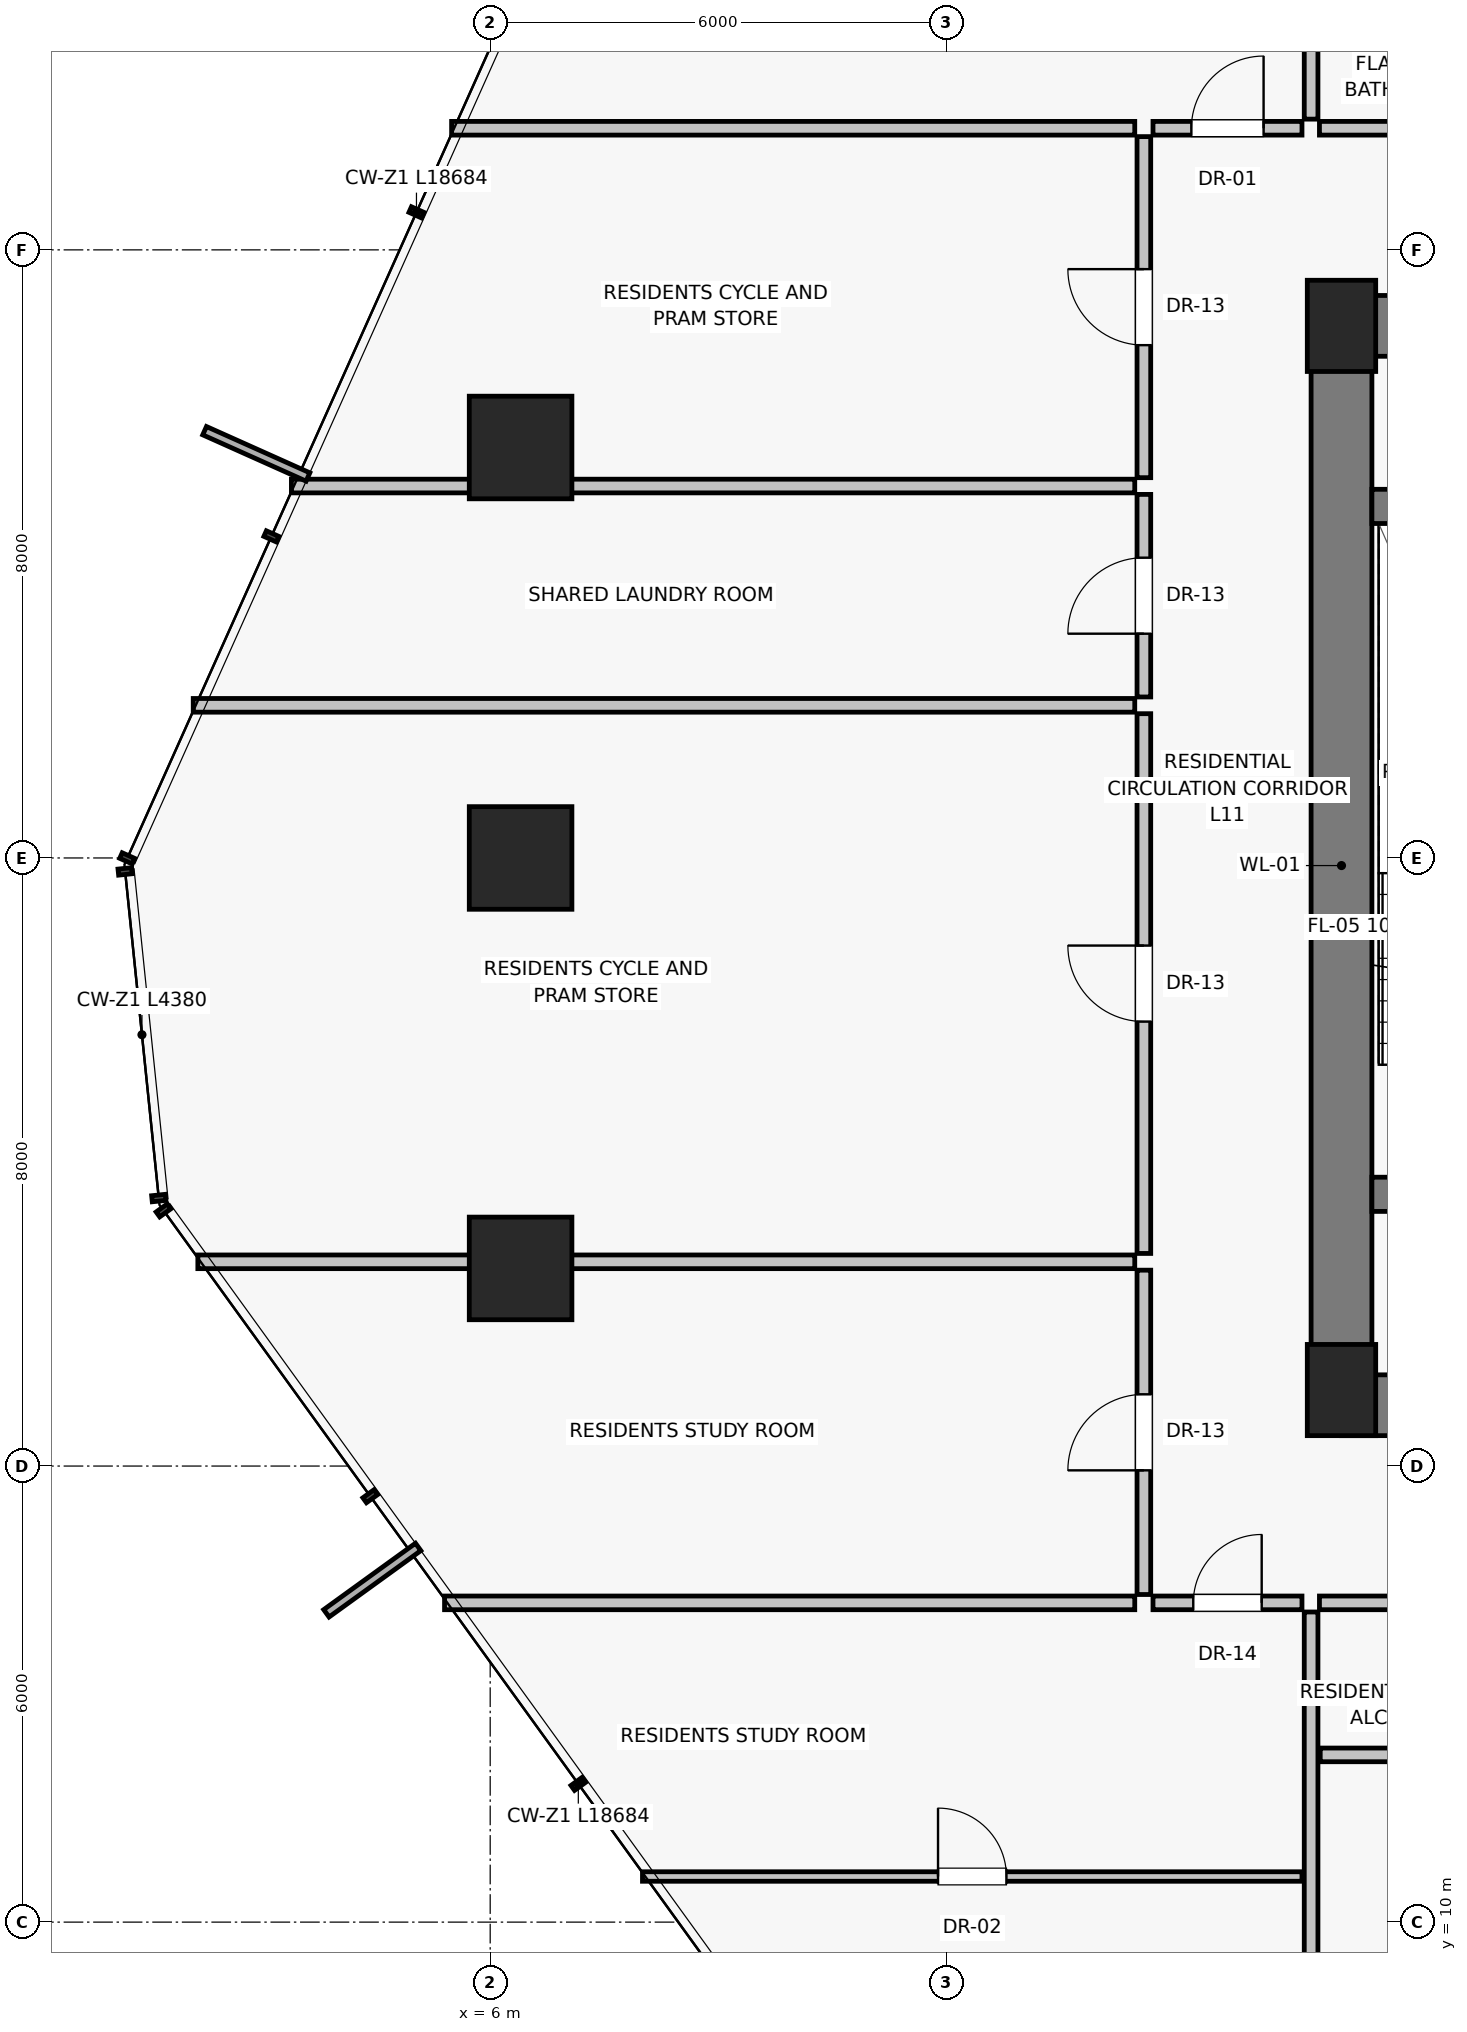
"""IFC4 building model, lengths in metres.
Left out: names, types, materials, properties, quantities, classifications, styles, units other than length and angle.
Written with IfcOpenShell. Run it as: python <this file> out.ifc"""

import sys

from ifc_helpers import new_model, si_unit, direction, frame, frame_2d, origin, origin_2d, place, context, subcontext, project, spatial, rectangle, extrude, source, transform, mapped, element, fill, save


model = new_model("IFC4")
c1 = context("Model", 3, precision=1e-05, world=origin(), true_north=direction((0.0, 1.0)))
c2 = subcontext(c1, "Body", "Model", "MODEL_VIEW")
j1 = project(units=[si_unit("LENGTHUNIT", "METRE"), si_unit("PLANEANGLEUNIT", "RADIAN")], contexts=[c1])
p1 = place(None, origin())
s1 = spatial("IfcSite", under=j1, at=p1, CompositionType="ELEMENT")
p2 = place(p1, origin())
s2 = spatial("IfcBuilding", under=s1, at=p2, CompositionType="ELEMENT")
p3 = place(p2, frame((0.0, 0.0, 43.55)))
s3 = spatial("IfcBuildingStorey", under=s2, at=p3, CompositionType="ELEMENT", Elevation=43.55)
for number, where, z_axis, x_axis in (
    (1, (17.2, 17.0, 0.0), (0.0, 0.0, 1.0), (1.0, 0.0, 0.0)),
    (2, (17.2, 31.0, 0.0), (0.0, 0.0, 1.0), (1.0, 0.0, 0.0)),
):
    element("IfcColumn", number, at=place(p3, frame(where, z_axis=z_axis, x_axis=x_axis)), inside=s3, PredefinedType="PILASTER", context=c2, shape_type="SweptSolid", body=[
        extrude(rectangle(XDim=0.9, YDim=1.2, at=origin_2d()), origin(), (0.0, 0.0, 1.0), 3.25),
    ])
for number, where, z_axis, x_axis in (
    (3, (6.4, 29.4, 0.0), (0.0, 0.0, 1.0), (1.0, 0.0, 0.0)),
    (4, (6.4, 24.0, 0.0), (0.0, 0.0, 1.0), (1.0, 0.0, 0.0)),
    (5, (6.4, 18.6, 0.0), (0.0, 0.0, 1.0), (1.0, 0.0, 0.0)),
):
    element("IfcColumn", number, at=place(p3, frame(where, z_axis=z_axis, x_axis=x_axis)), inside=s3, PredefinedType="COLUMN", context=c2, shape_type="SweptSolid", body=[
        extrude(rectangle(XDim=1.35, YDim=1.35, at=origin_2d()), origin(), (0.0, 0.0, 1.0), 3.25),
    ])
p4 = place(p3, frame((17.2, 16.8, 0.0), z_axis=(0.0, 0.0, 1.0), x_axis=(0.0, 1.0, 0.0)))
e6 = element("IfcWall", 6, at=p4, inside=s3, PredefinedType="SHEAR", context=c2, shape_type="SweptSolid", body=[
    extrude(rectangle(XDim=14.2, YDim=0.8, at=frame_2d((7.1, 0.0))), origin(), (0.0, 0.0, 1.0), 3.0),
])
p5 = place(p3, frame((17.2, 16.8, 0.0), z_axis=(0.0, 0.0, 1.0), x_axis=(1.0, 0.0, 0.0)))
e7 = element("IfcWall", 7, at=p5, inside=s3, PredefinedType="SHEAR", context=c2, shape_type="SweptSolid", body=[
    extrude(rectangle(XDim=5.85, YDim=0.8, at=frame_2d((2.925, 0.0))), origin(), (0.0, 0.0, 1.0), 3.0),
])
p6 = place(p5, frame((1.15, 0.0, 0.0)))
e8 = element("IfcOpeningElement", 8, at=p6, cuts=e7, PredefinedType="OPENING", context=c2, shape_type="SweptSolid", body=[
    extrude(rectangle(XDim=1.2, YDim=2.03, at=frame_2d((0.6, 1.015))), frame((0.0, 0.41, 0.0), z_axis=(0.0, -1.0, 0.0), x_axis=(1.0, 0.0, 0.0)), (0.0, 0.0, 1.0), 0.82),
])
p7 = place(p3, frame((17.2, 31.0, 0.0), z_axis=(0.0, 0.0, 1.0), x_axis=(1.0, 0.0, 0.0)))
e9 = element("IfcWall", 9, at=p7, inside=s3, PredefinedType="SHEAR", context=c2, shape_type="SweptSolid", body=[
    extrude(rectangle(XDim=3.8, YDim=0.8, at=frame_2d((1.9, 0.0))), origin(), (0.0, 0.0, 1.0), 3.0),
])
p8 = place(p7, frame((1.25, 0.0, 0.0)))
e10 = element("IfcOpeningElement", 10, at=p8, cuts=e9, PredefinedType="OPENING", context=c2, shape_type="SweptSolid", body=[
    extrude(rectangle(XDim=0.86, YDim=2.01, at=frame_2d((0.43, 1.005))), frame((0.0, 0.41, 0.0), z_axis=(0.0, -1.0, 0.0), x_axis=(1.0, 0.0, 0.0)), (0.0, 0.0, 1.0), 0.82),
])
p9 = place(p3, frame((17.6, 19.575, 0.0), z_axis=(0.0, 0.0, 1.0), x_axis=(1.0, 0.0, 0.0)))
e11 = element("IfcWall", 11, at=p9, inside=s3, PredefinedType="SHEAR", context=c2, shape_type="SweptSolid", body=[
    extrude(rectangle(XDim=3.425, YDim=0.45, at=frame_2d((1.712, 0.0))), origin(), (0.0, 0.0, 1.0), 3.0),
])
p10 = place(p9, frame((1.05, 0.0, 0.0)))
e12 = element("IfcOpeningElement", 12, at=p10, cuts=e11, PredefinedType="OPENING", context=c2, shape_type="SweptSolid", body=[
    extrude(rectangle(XDim=1.1, YDim=2.03, at=frame_2d((0.55, 1.015))), frame((0.0, 0.235, 0.0), z_axis=(0.0, -1.0, 0.0), x_axis=(1.0, 0.0, 0.0)), (0.0, 0.0, 1.0), 0.47),
])
p11 = place(p3, frame((17.6, 28.625, 0.0), z_axis=(0.0, 0.0, 1.0), x_axis=(1.0, 0.0, 0.0)))
e13 = element("IfcWall", 13, at=p11, inside=s3, PredefinedType="SHEAR", context=c2, shape_type="SweptSolid", body=[
    extrude(rectangle(XDim=3.425, YDim=0.45, at=frame_2d((1.712, 0.0))), origin(), (0.0, 0.0, 1.0), 3.0),
])
p12 = place(p3, frame((16.8, 14.08, 0.0), z_axis=(0.0, 0.0, 1.0), x_axis=(0.0, -1.0, 0.0)))
e14 = element("IfcWall", 14, at=p12, inside=s3, PredefinedType="PARTITIONING", context=c2, shape_type="SweptSolid", body=[
    extrude(rectangle(XDim=11.746, YDim=0.18, at=frame_2d((5.873, 0.0))), origin(), (0.0, 0.0, 1.0), 3.0),
])
p13 = place(p3, frame((16.91, 14.2, 0.0), z_axis=(0.0, 0.0, 1.0), x_axis=(1.0, 0.0, 0.0)))
e15 = element("IfcWall", 15, at=p13, inside=s3, PredefinedType="PARTITIONING", context=c2, shape_type="SweptSolid", body=[
    extrude(rectangle(XDim=4.1, YDim=0.18, at=frame_2d((2.05, 0.0))), origin(), (0.0, 0.0, 1.0), 3.0),
])
p14 = place(p13, frame((1.55, 0.0, 0.0)))
e16 = element("IfcOpeningElement", 16, at=p14, cuts=e15, PredefinedType="OPENING", context=c2, shape_type="SweptSolid", body=[
    extrude(rectangle(XDim=1.0, YDim=2.01, at=frame_2d((0.5, 1.005))), frame((0.0, 0.1, 0.0), z_axis=(0.0, -1.0, 0.0), x_axis=(1.0, 0.0, 0.0)), (0.0, 0.0, 1.0), 0.2),
])
p15 = place(p3, frame((16.92, 12.2, 0.0), z_axis=(0.0, 0.0, 1.0), x_axis=(1.0, 0.0, 0.0)))
e17 = element("IfcWall", 17, at=p15, inside=s3, PredefinedType="PARTITIONING", context=c2, shape_type="SweptSolid", body=[
    extrude(rectangle(XDim=4.1, YDim=0.18, at=frame_2d((2.05, 0.0))), origin(), (0.0, 0.0, 1.0), 3.0),
])
p16 = place(p3, frame((16.8, 33.72, 0.0), z_axis=(0.0, 0.0, 1.0), x_axis=(0.0, 1.0, 0.0)))
e18 = element("IfcWall", 18, at=p16, inside=s3, PredefinedType="PARTITIONING", context=c2, shape_type="SweptSolid", body=[
    extrude(rectangle(XDim=10.463, YDim=0.18, at=frame_2d((5.231, 0.0))), origin(), (0.0, 0.0, 1.0), 3.0),
])
p17 = place(p3, frame((16.91, 33.6, 0.0), z_axis=(0.0, 0.0, 1.0), x_axis=(1.0, 0.0, 0.0)))
e19 = element("IfcWall", 19, at=p17, inside=s3, PredefinedType="PARTITIONING", context=c2, shape_type="SweptSolid", body=[
    extrude(rectangle(XDim=5.788, YDim=0.18, at=frame_2d((2.894, 0.0))), origin(), (0.0, 0.0, 1.0), 3.0),
])
p18 = place(p17, frame((3.484, 0.0, 0.0)))
e20 = element("IfcOpeningElement", 20, at=p18, cuts=e19, PredefinedType="OPENING", context=c2, shape_type="SweptSolid", body=[
    extrude(rectangle(XDim=0.95, YDim=2.02, at=frame_2d((0.475, 1.01))), frame((0.0, 0.1, 0.0), z_axis=(0.0, -1.0, 0.0), x_axis=(1.0, 0.0, 0.0)), (0.0, 0.0, 1.0), 0.2),
])
p19 = place(p3, frame((14.48, 14.2, 0.0), z_axis=(0.0, 0.0, 1.0), x_axis=(-1.0, 0.0, 0.0)))
e21 = element("IfcWall", 21, at=p19, inside=s3, PredefinedType="PARTITIONING", context=c2, shape_type="SweptSolid", body=[
    extrude(rectangle(XDim=9.08, YDim=0.18, at=frame_2d((4.54, 0.0))), origin(), (0.0, 0.0, 1.0), 3.0),
])
p20 = place(p3, frame((14.48, 33.6, 0.0), z_axis=(0.0, 0.0, 1.0), x_axis=(-1.0, 0.0, 0.0)))
e22 = element("IfcWall", 22, at=p20, inside=s3, PredefinedType="PARTITIONING", context=c2, shape_type="SweptSolid", body=[
    extrude(rectangle(XDim=8.988, YDim=0.18, at=frame_2d((4.494, 0.0))), origin(), (0.0, 0.0, 1.0), 3.0),
])
p21 = place(p3, frame((14.6, 14.31, 0.0), z_axis=(0.0, 0.0, 1.0), x_axis=(0.0, 1.0, 0.0)))
e23 = element("IfcWall", 23, at=p21, inside=s3, PredefinedType="PARTITIONING", context=c2, shape_type="SweptSolid", body=[
    extrude(rectangle(XDim=4.267, YDim=0.18, at=frame_2d((2.133, 0.0))), origin(), (0.0, 0.0, 1.0), 3.0),
])
p22 = place(p21, frame((1.634, 0.0, 0.0)))
e24 = element("IfcOpeningElement", 24, at=p22, cuts=e23, PredefinedType="OPENING", context=c2, shape_type="SweptSolid", body=[
    extrude(rectangle(XDim=1.0, YDim=2.01, at=frame_2d((0.5, 1.005))), frame((0.0, 0.1, 0.0), z_axis=(0.0, -1.0, 0.0), x_axis=(1.0, 0.0, 0.0)), (0.0, 0.0, 1.0), 0.2),
])
p23 = place(p3, frame((14.6, 18.797, 0.0), z_axis=(0.0, 0.0, 1.0), x_axis=(0.0, 1.0, 0.0)))
e25 = element("IfcWall", 25, at=p23, inside=s3, PredefinedType="PARTITIONING", context=c2, shape_type="SweptSolid", body=[
    extrude(rectangle(XDim=7.101, YDim=0.18, at=frame_2d((3.55, 0.0))), origin(), (0.0, 0.0, 1.0), 3.0),
])
p24 = place(p23, frame((3.051, 0.0, 0.0)))
e26 = element("IfcOpeningElement", 26, at=p24, cuts=e25, PredefinedType="OPENING", context=c2, shape_type="SweptSolid", body=[
    extrude(rectangle(XDim=1.0, YDim=2.01, at=frame_2d((0.5, 1.005))), frame((0.0, 0.1, 0.0), z_axis=(0.0, -1.0, 0.0), x_axis=(1.0, 0.0, 0.0)), (0.0, 0.0, 1.0), 0.2),
])
p25 = place(p3, frame((14.48, 18.687, 0.0), z_axis=(0.0, 0.0, 1.0), x_axis=(-1.0, 0.0, 0.0)))
e27 = element("IfcWall", 27, at=p25, inside=s3, PredefinedType="PARTITIONING", context=c2, shape_type="SweptSolid", body=[
    extrude(rectangle(XDim=12.326, YDim=0.18, at=frame_2d((6.163, 0.0))), origin(), (0.0, 0.0, 1.0), 2.299),
])
p26 = place(p3, frame((14.48, 26.008, 0.0), z_axis=(0.0, 0.0, 1.0), x_axis=(-1.0, 0.0, 0.0)))
e28 = element("IfcWall", 28, at=p26, inside=s3, PredefinedType="PARTITIONING", context=c2, shape_type="SweptSolid", body=[
    extrude(rectangle(XDim=12.387, YDim=0.18, at=frame_2d((6.193, 0.0))), origin(), (0.0, 0.0, 1.0), 3.0),
])
p27 = place(p3, frame((14.6, 26.118, 0.0), z_axis=(0.0, 0.0, 1.0), x_axis=(0.0, 1.0, 0.0)))
e29 = element("IfcWall", 29, at=p27, inside=s3, PredefinedType="PARTITIONING", context=c2, shape_type="SweptSolid", body=[
    extrude(rectangle(XDim=2.665, YDim=0.18, at=frame_2d((1.333, 0.0))), origin(), (0.0, 0.0, 1.0), 3.0),
])
p28 = place(p27, frame((0.833, 0.0, 0.0)))
e30 = element("IfcOpeningElement", 30, at=p28, cuts=e29, PredefinedType="OPENING", context=c2, shape_type="SweptSolid", body=[
    extrude(rectangle(XDim=1.0, YDim=2.01, at=frame_2d((0.5, 1.005))), frame((0.0, 0.1, 0.0), z_axis=(0.0, -1.0, 0.0), x_axis=(1.0, 0.0, 0.0)), (0.0, 0.0, 1.0), 0.2),
])
p29 = place(p3, frame((14.6, 29.003, 0.0), z_axis=(0.0, 0.0, 1.0), x_axis=(0.0, 1.0, 0.0)))
e31 = element("IfcWall", 31, at=p29, inside=s3, PredefinedType="PARTITIONING", context=c2, shape_type="SweptSolid", body=[
    extrude(rectangle(XDim=4.487, YDim=0.18, at=frame_2d((2.244, 0.0))), origin(), (0.0, 0.0, 1.0), 3.0),
])
p30 = place(p29, frame((1.743, 0.0, 0.0)))
e32 = element("IfcOpeningElement", 32, at=p30, cuts=e31, PredefinedType="OPENING", context=c2, shape_type="SweptSolid", body=[
    extrude(rectangle(XDim=1.0, YDim=2.01, at=frame_2d((0.5, 1.005))), frame((0.0, 0.1, 0.0), z_axis=(0.0, -1.0, 0.0), x_axis=(1.0, 0.0, 0.0)), (0.0, 0.0, 1.0), 0.2),
])
p31 = place(p3, frame((14.48, 28.893, 0.0), z_axis=(0.0, 0.0, 1.0), x_axis=(-1.0, 0.0, 0.0)))
e33 = element("IfcWall", 33, at=p31, inside=s3, PredefinedType="PARTITIONING", context=c2, shape_type="SweptSolid", body=[
    extrude(rectangle(XDim=11.095, YDim=0.18, at=frame_2d((5.547, 0.0))), origin(), (0.0, 0.0, 1.0), 2.299),
])
p32 = place(p3, frame((14.72, 14.2, 0.0), z_axis=(0.0, 0.0, 1.0), x_axis=(1.0, 0.0, 0.0)))
e34 = element("IfcWall", 34, at=p32, inside=s3, PredefinedType="PARTITIONING", context=c2, shape_type="SweptSolid", body=[
    extrude(rectangle(XDim=1.96, YDim=0.18, at=frame_2d((0.98, 0.0))), origin(), (0.0, 0.0, 1.0), 3.0),
])
p33 = place(p32, frame((0.53, 0.0, 0.0)))
e35 = element("IfcOpeningElement", 35, at=p33, cuts=e34, PredefinedType="OPENING", context=c2, shape_type="SweptSolid", body=[
    extrude(rectangle(XDim=0.9, YDim=2.01, at=frame_2d((0.45, 1.005))), frame((0.0, 0.1, 0.0), z_axis=(0.0, -1.0, 0.0), x_axis=(1.0, 0.0, 0.0)), (0.0, 0.0, 1.0), 0.2),
])
p34 = place(p3, frame((8.004, 10.6, 0.0), z_axis=(0.0, 0.0, 1.0), x_axis=(1.0, 0.0, 0.0)))
e36 = element("IfcWall", 36, at=p34, inside=s3, PredefinedType="PARTITIONING", context=c2, shape_type="SweptSolid", body=[
    extrude(rectangle(XDim=8.676, YDim=0.125, at=frame_2d((4.338, 0.0))), origin(), (0.0, 0.0, 1.0), 3.0),
])
p35 = place(p34, frame((3.888, 0.0, 0.0)))
e37 = element("IfcOpeningElement", 37, at=p35, cuts=e36, PredefinedType="OPENING", context=c2, shape_type="SweptSolid", body=[
    extrude(rectangle(XDim=0.9, YDim=2.01, at=frame_2d((0.45, 1.005))), frame((0.0, 0.073, 0.0), z_axis=(0.0, -1.0, 0.0), x_axis=(1.0, 0.0, 0.0)), (0.0, 0.0, 1.0), 0.145),
])
p36 = place(p3, frame((14.72, 33.6, 0.0), z_axis=(0.0, 0.0, 1.0), x_axis=(1.0, 0.0, 0.0)))
e38 = element("IfcWall", 38, at=p36, inside=s3, PredefinedType="PARTITIONING", context=c2, shape_type="SweptSolid", body=[
    extrude(rectangle(XDim=1.96, YDim=0.18, at=frame_2d((0.98, 0.0))), origin(), (0.0, 0.0, 1.0), 3.0),
])
p37 = place(p36, frame((0.505, 0.0, 0.0)))
e39 = element("IfcOpeningElement", 39, at=p37, cuts=e38, PredefinedType="OPENING", context=c2, shape_type="SweptSolid", body=[
    extrude(rectangle(XDim=0.95, YDim=2.02, at=frame_2d((0.475, 1.01))), frame((0.0, 0.1, 0.0), z_axis=(0.0, -1.0, 0.0), x_axis=(1.0, 0.0, 0.0)), (0.0, 0.0, 1.0), 0.2),
])
m1 = source(origin(), c2, "Body", "SweptSolid", [
    extrude(rectangle(XDim=1.0, YDim=2.01, at=frame_2d((0.5, 1.005))), frame((0.0, 0.025, 0.0), z_axis=(0.0, -1.0, 0.0), x_axis=(1.0, 0.0, 0.0)), (0.0, 0.0, 1.0), 0.05),
])
p38 = place(p22, origin())
e40 = element("IfcDoor", 40, at=p38, inside=s3, OperationType="SINGLE_SWING_LEFT", PredefinedType="DOOR", context=c2, shape_type="MappedRepresentation", body=[
    mapped(m1, transform((0.0, 0.0, 0.0), scale=1.0)),
])
fill(e24, e40)
p39 = place(p24, origin())
e41 = element("IfcDoor", 41, at=p39, inside=s3, OperationType="SINGLE_SWING_RIGHT", PredefinedType="DOOR", context=c2, shape_type="MappedRepresentation", body=[
    mapped(m1, transform((0.0, 0.0, 0.0), scale=1.0)),
])
fill(e26, e41)
p40 = place(p28, origin())
e42 = element("IfcDoor", 42, at=p40, inside=s3, OperationType="SINGLE_SWING_LEFT", PredefinedType="DOOR", context=c2, shape_type="MappedRepresentation", body=[
    mapped(m1, transform((0.0, 0.0, 0.0), scale=1.0)),
])
fill(e30, e42)
p41 = place(p30, origin())
e43 = element("IfcDoor", 43, at=p41, inside=s3, OperationType="SINGLE_SWING_RIGHT", PredefinedType="DOOR", context=c2, shape_type="MappedRepresentation", body=[
    mapped(m1, transform((0.0, 0.0, 0.0), scale=1.0)),
])
fill(e32, e43)
m2 = source(origin(), c2, "Body", "SweptSolid", [
    extrude(rectangle(XDim=0.9, YDim=2.01, at=frame_2d((0.45, 1.005))), frame((0.0, 0.025, 0.0), z_axis=(0.0, -1.0, 0.0), x_axis=(1.0, 0.0, 0.0)), (0.0, 0.0, 1.0), 0.05),
])
p42 = place(p33, origin())
e44 = element("IfcDoor", 44, at=p42, inside=s3, OperationType="SINGLE_SWING_RIGHT", PredefinedType="DOOR", context=c2, shape_type="MappedRepresentation", body=[
    mapped(m2, transform((0.0, 0.0, 0.0), scale=1.0)),
])
fill(e35, e44)
p43 = place(p35, origin())
e45 = element("IfcDoor", 45, at=p43, inside=s3, OperationType="SINGLE_SWING_LEFT", PredefinedType="DOOR", context=c2, shape_type="MappedRepresentation", body=[
    mapped(m2, transform((0.0, 0.0, 0.0), scale=1.0)),
])
fill(e37, e45)
m3 = source(origin(), c2, "Body", "SweptSolid", [
    extrude(rectangle(XDim=0.95, YDim=2.02, at=frame_2d((0.475, 1.01))), frame((0.0, 0.025, 0.0), z_axis=(0.0, -1.0, 0.0), x_axis=(1.0, 0.0, 0.0)), (0.0, 0.0, 1.0), 0.05),
])
p44 = place(p37, origin())
e46 = element("IfcDoor", 46, at=p44, inside=s3, OperationType="SINGLE_SWING_RIGHT", PredefinedType="DOOR", context=c2, shape_type="MappedRepresentation", body=[
    mapped(m3, transform((0.0, 0.0, 0.0), scale=1.0)),
])
fill(e39, e46)
save(model, sys.argv[1])
